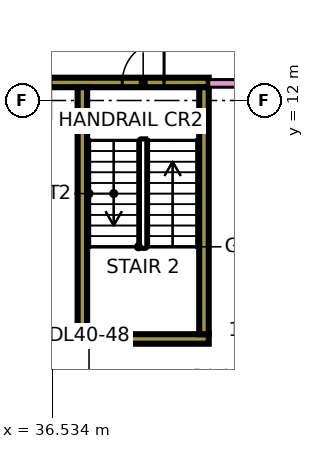
"""IFC4 building model, lengths in metres.
Left out: names, types, materials, properties, quantities, classifications, styles, units other than length and angle.
Written with IfcOpenShell. Run it as: python <this file> out.ifc"""

import sys

from ifc_helpers import new_model, si_unit, direction, frame, frame_2d, origin, place, context, subcontext, project, spatial, rectangle, extrude, element, fill, save


model = new_model("IFC4")
c1 = context("Model", 3, precision=1e-05, world=origin(), true_north=direction((0.0, 1.0)))
c2 = subcontext(c1, "Body", "Model", "MODEL_VIEW")
j1 = project(units=[si_unit("LENGTHUNIT", "METRE"), si_unit("PLANEANGLEUNIT", "RADIAN")], contexts=[c1])
p1 = place(None, origin())
s1 = spatial("IfcSite", under=j1, at=p1, CompositionType="ELEMENT")
p2 = place(p1, origin())
s2 = spatial("IfcBuilding", under=s1, at=p2, CompositionType="ELEMENT")
p3 = place(p2, frame((0.0, 0.0, 176.15)))
s3 = spatial("IfcBuildingStorey", under=s2, at=p3, CompositionType="ELEMENT", Elevation=176.15)
p4 = place(p3, frame((37.2, 5.725, 0.0), z_axis=(0.0, 0.0, 1.0), x_axis=(1.0, 0.0, 0.0)))
e1 = element("IfcWall", 1, at=p4, inside=s3, PredefinedType="SHEAR", context=c2, shape_type="SweptSolid", body=[
    extrude(rectangle(XDim=3.45, YDim=0.25, at=frame_2d((1.725, 0.0))), origin(), (0.0, 0.0, 1.0), 3.75),
])
p5 = place(p3, frame((36.45, 12.475, 0.0), z_axis=(0.0, 0.0, 1.0), x_axis=(1.0, 0.0, 0.0)))
e2 = element("IfcWall", 2, at=p5, inside=s3, PredefinedType="SHEAR", context=c2, shape_type="SweptSolid", body=[
    extrude(rectangle(XDim=4.2, YDim=0.25, at=frame_2d((2.1, 0.0))), origin(), (0.0, 0.0, 1.0), 3.75),
])
p6 = place(p5, frame((1.925, 0.0, 0.0)))
e3 = element("IfcOpeningElement", 3, at=p6, cuts=e2, PredefinedType="OPENING", context=c2, shape_type="SweptSolid", body=[
    extrude(rectangle(XDim=1.1, YDim=2.2, at=frame_2d((0.55, 1.1))), frame((0.0, 0.135, 0.0), z_axis=(0.0, -1.0, 0.0), x_axis=(1.0, 0.0, 0.0)), (0.0, 0.0, 1.0), 0.27),
])
for number, where, z_axis, x_axis in (
    (4, (37.325, 5.85, 0.0), (0.0, 0.0, 1.0), (0.0, 1.0, 0.0)),
    (5, (40.525, 5.85, 0.0), (0.0, 0.0, 1.0), (0.0, 1.0, 0.0)),
):
    element("IfcWall", number, at=place(p3, frame(where, z_axis=z_axis, x_axis=x_axis)), inside=s3, PredefinedType="SHEAR", context=c2, shape_type="SweptSolid", body=[
        extrude(rectangle(XDim=6.5, YDim=0.25, at=frame_2d((3.25, 0.0))), origin(), (0.0, 0.0, 1.0), 3.75),
    ])
p7 = place(p3, frame((40.65, 12.45, 0.0), z_axis=(0.0, 0.0, 1.0), x_axis=(1.0, 0.0, 0.0)))
e6 = element("IfcWall", 6, at=p7, inside=s3, PredefinedType="PARTITIONING", context=c2, shape_type="SweptSolid", body=[
    extrude(rectangle(XDim=22.35, YDim=0.2, at=frame_2d((11.175, 0.0))), origin(), (0.0, 0.0, 1.0), 3.35),
])
p8 = place(p7, frame((8.25, 0.0, 0.0)))
e7 = element("IfcOpeningElement", 7, at=p8, cuts=e6, PredefinedType="OPENING", context=c2, shape_type="SweptSolid", body=[
    extrude(rectangle(XDim=1.0, YDim=2.1, at=frame_2d((0.5, 1.05))), frame((0.0, 0.11, 0.0), z_axis=(0.0, -1.0, 0.0), x_axis=(1.0, 0.0, 0.0)), (0.0, 0.0, 1.0), 0.22),
])
p9 = place(p7, frame((1.05, 0.0, 0.0)))
e8 = element("IfcOpeningElement", 8, at=p9, cuts=e6, PredefinedType="OPENING", context=c2, shape_type="SweptSolid", body=[
    extrude(rectangle(XDim=1.0, YDim=2.1, at=frame_2d((0.5, 1.05))), frame((0.0, 0.11, 0.0), z_axis=(0.0, -1.0, 0.0), x_axis=(1.0, 0.0, 0.0)), (0.0, 0.0, 1.0), 0.22),
])
p10 = place(p6, frame((1.1, 0.0, 0.0), z_axis=(0.0, 0.0, 1.0), x_axis=(-1.0, 0.0, 0.0)))
e9 = element("IfcDoor", 9, at=p10, inside=s3, OperationType="SINGLE_SWING_RIGHT", PredefinedType="DOOR", context=c2, shape_type="SweptSolid", body=[
    extrude(rectangle(XDim=1.1, YDim=2.2, at=frame_2d((0.55, 1.1))), frame((0.0, 0.025, 0.0), z_axis=(0.0, -1.0, 0.0), x_axis=(1.0, 0.0, 0.0)), (0.0, 0.0, 1.0), 0.05),
])
fill(e3, e9)
save(model, sys.argv[1])
